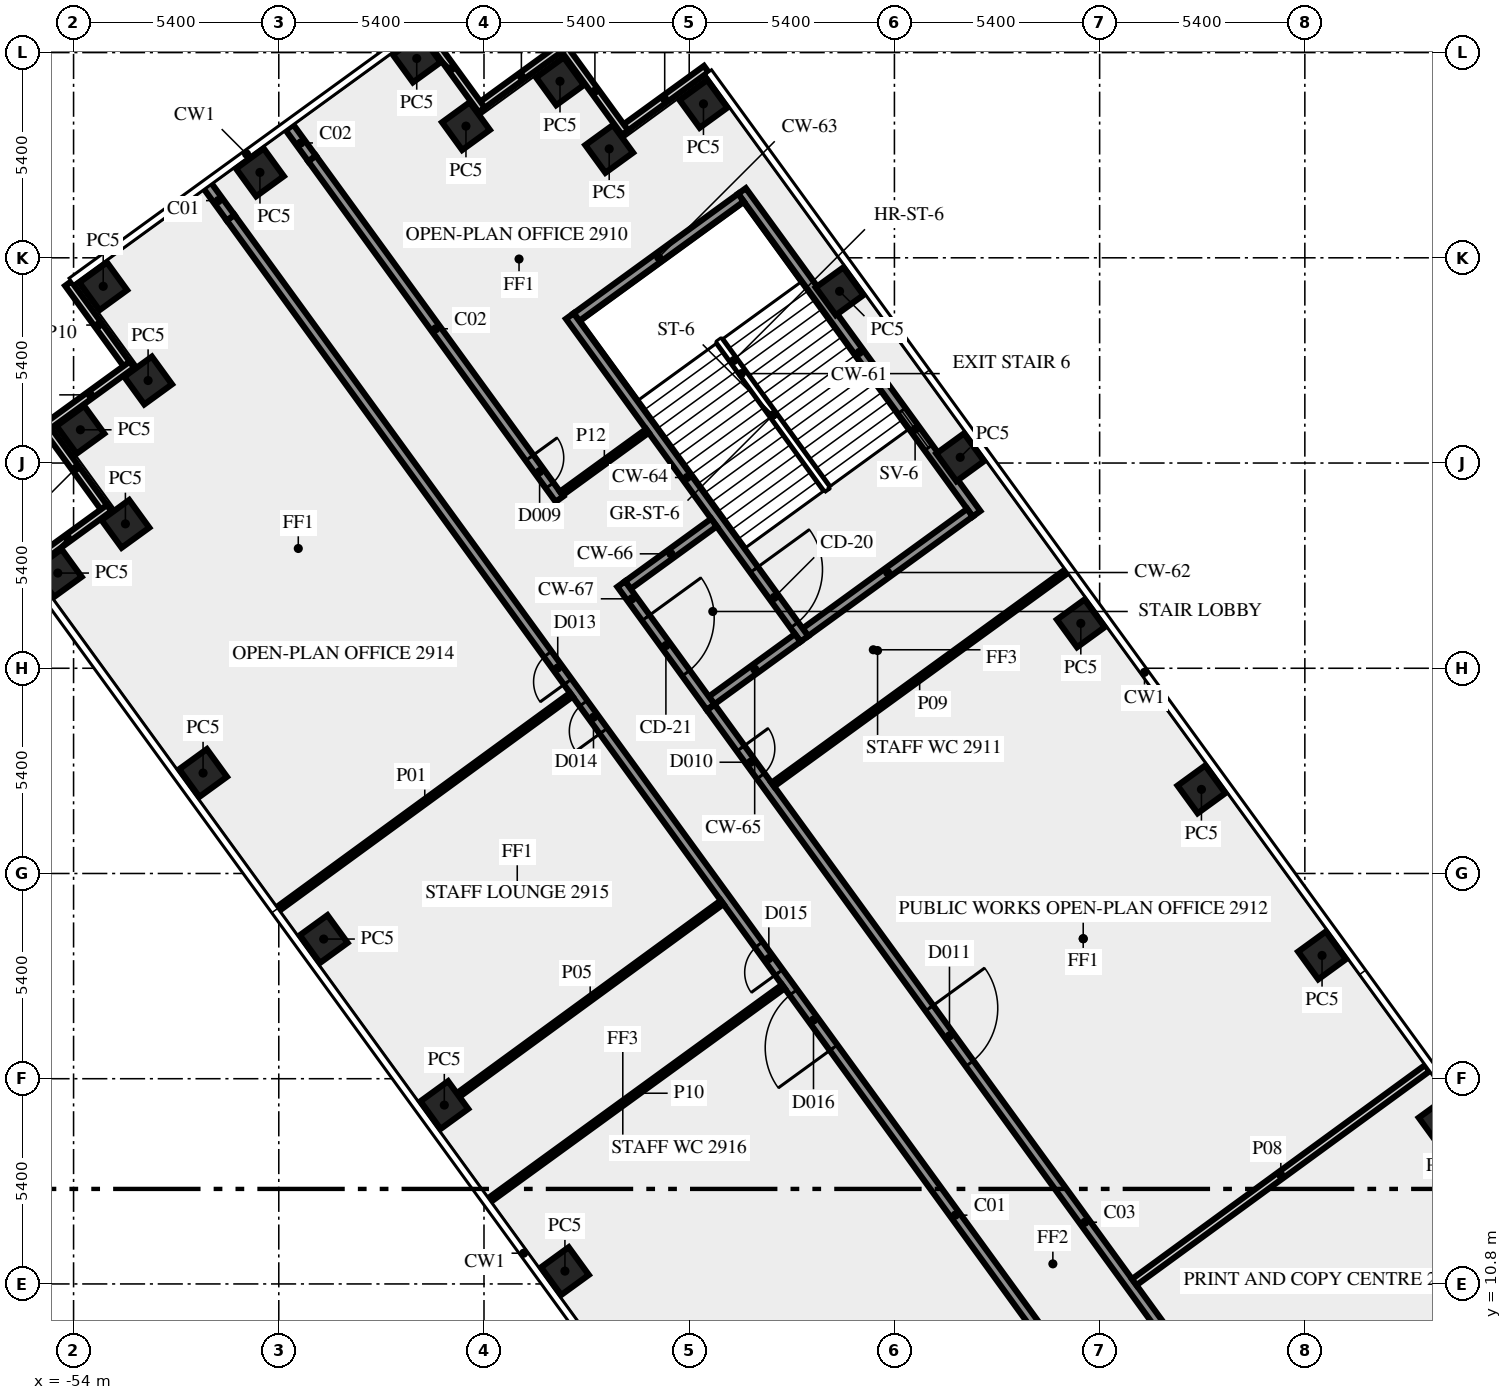
"""IFC4 building model, lengths in metres.
Left out: names, types, materials, properties, quantities, classifications, styles, units other than length and angle.
Written with IfcOpenShell. Run it as: python <this file> out.ifc"""

import sys

from ifc_helpers import new_model, si_unit, direction, frame, frame_2d, origin, origin_2d, place, context, subcontext, project, spatial, rectangle, extrude, element, fill, save


model = new_model("IFC4")
c1 = context("Model", 3, precision=1e-05, world=origin(), true_north=direction((0.0, 1.0)))
c2 = subcontext(c1, "Body", "Model", "MODEL_VIEW")
j1 = project(units=[si_unit("LENGTHUNIT", "METRE"), si_unit("PLANEANGLEUNIT", "RADIAN")], contexts=[c1])
p1 = place(None, origin())
s1 = spatial("IfcSite", under=j1, at=p1, CompositionType="ELEMENT")
p2 = place(p1, origin())
s2 = spatial("IfcBuilding", under=s1, at=p2, CompositionType="ELEMENT")
p3 = place(p2, frame((0.0, 0.0, 125.0)))
s3 = spatial("IfcBuildingStorey", under=s2, at=p3, CompositionType="ELEMENT", Elevation=125.0)
for number, where, z_axis, x_axis in (
    (1, (-17.974, 15.075, 0.0), (0.0, 0.0, 1.0), (-0.588, 0.809, 0.0)),
    (2, (-21.147, 19.444, 0.0), (0.0, 0.0, 1.0), (-0.588, 0.809, 0.0)),
    (3, (-24.321, 23.812, 0.0), (0.0, 0.0, 1.0), (-0.588, 0.809, 0.0)),
    (4, (-27.495, 28.181, 0.0), (0.0, 0.0, 1.0), (-0.588, 0.809, 0.0)),
    (5, (-30.669, 32.55, 0.0), (0.0, 0.0, 1.0), (-0.588, 0.809, 0.0)),
    (6, (-33.843, 36.919, 0.0), (0.0, 0.0, 1.0), (-0.588, 0.809, 0.0)),
    (7, (-37.425, 41.85, 0.0), (0.0, 0.0, 1.0), (-0.588, 0.809, 0.0)),
    (8, (-39.906, 40.666, 0.0), (0.0, 0.0, 1.0), (-0.588, 0.809, 0.0)),
    (9, (-41.2, 42.445, 0.0), (0.0, 0.0, 1.0), (-0.588, 0.809, 0.0)),
    (10, (-43.675, 41.265, 0.0), (0.0, 0.0, 1.0), (-0.809, -0.588, 0.0)),
    (11, (-44.97, 43.045, 0.0), (0.0, 0.0, 1.0), (-0.809, -0.588, 0.0)),
    (12, (-49.096, 40.047, 0.0), (0.0, 0.0, 1.0), (-0.809, -0.588, 0.0)),
    (13, (-53.22, 37.05, 0.0), (0.0, 0.0, 1.0), (0.588, -0.809, 0.0)),
    (14, (-52.039, 34.571, 0.0), (0.0, 0.0, 1.0), (-0.809, -0.588, 0.0)),
    (15, (-53.82, 33.275, 0.0), (0.0, 0.0, 1.0), (0.588, -0.809, 0.0)),
    (16, (-52.636, 30.8, 0.0), (0.0, 0.0, 1.0), (-0.809, -0.588, 0.0)),
    (17, (-54.415, 29.505, 0.0), (0.0, 0.0, 1.0), (0.588, -0.809, 0.0)),
    (18, (-50.592, 24.243, 0.0), (0.0, 0.0, 1.0), (0.588, -0.809, 0.0)),
    (19, (-47.418, 19.875, 0.0), (0.0, 0.0, 1.0), (0.588, -0.809, 0.0)),
    (20, (-44.244, 15.506, 0.0), (0.0, 0.0, 1.0), (0.588, -0.809, 0.0)),
    (21, (-41.07, 11.137, 0.0), (0.0, 0.0, 1.0), (0.588, -0.809, 0.0)),
):
    element("IfcColumn", number, at=place(p3, frame(where, z_axis=z_axis, x_axis=x_axis)), inside=s3, PredefinedType="COLUMN", context=c2, shape_type="SweptSolid", body=[
        extrude(rectangle(XDim=0.9, YDim=0.9, at=origin_2d()), origin(), (0.0, 0.0, 1.0), 3.65),
    ])
p4 = place(p3, frame((-37.353, 42.768, 0.0), z_axis=(0.0, 0.0, 1.0), x_axis=(-0.809033161865, -0.587762999008, 0.0)))
e22 = element("IfcWall", 22, at=p4, inside=s3, PredefinedType="SOLIDWALL", context=c2, shape_type="SweptSolid", body=[
    extrude(rectangle(XDim=2.7, YDim=0.2, at=frame_2d((1.35, 0.0))), origin(), (0.0, 0.0, 1.0), 3.65),
])
p5 = place(p3, frame((-39.488, 41.094, 0.0), z_axis=(0.0, 0.0, 1.0), x_axis=(-0.587806000234, 0.809001919707, 0.0)))
e23 = element("IfcWall", 23, at=p5, inside=s3, PredefinedType="SOLIDWALL", context=c2, shape_type="SweptSolid", body=[
    extrude(rectangle(XDim=2.7, YDim=0.2, at=frame_2d((1.35, 0.0))), origin(), (0.0, 0.0, 1.0), 3.65),
])
for number, where, z_axis, x_axis in (
    (24, (-41.124, 43.366, 0.0), (0.0, 0.0, 1.0), (-0.809, -0.588, 0.0)),
    (25, (-43.259, 41.691, 0.0), (0.0, 0.0, 1.0), (-0.588, 0.809, 0.0)),
    (26, (-54.14, 37.123, 0.0), (0.0, 0.0, 1.0), (0.588, -0.809, 0.0)),
    (27, (-52.465, 34.987, 0.0), (0.0, 0.0, 1.0), (-0.809, -0.588, 0.0)),
):
    element("IfcWall", number, at=place(p3, frame(where, z_axis=z_axis, x_axis=x_axis)), inside=s3, PredefinedType="SOLIDWALL", context=c2, shape_type="SweptSolid", body=[
        extrude(rectangle(XDim=2.7, YDim=0.2, at=frame_2d((1.35, 0.0))), origin(), (0.0, 0.0, 1.0), 3.65),
    ])
p6 = place(p3, frame((-54.738, 33.351, 0.0), z_axis=(0.0, 0.0, 1.0), x_axis=(0.587779184282, -0.809021403008, 0.0)))
e28 = element("IfcWall", 28, at=p6, inside=s3, PredefinedType="SOLIDWALL", context=c2, shape_type="SweptSolid", body=[
    extrude(rectangle(XDim=2.7, YDim=0.2, at=frame_2d((1.35, 0.0))), origin(), (0.0, 0.0, 1.0), 3.65),
])
p7 = place(p3, frame((-53.063, 31.216, 0.0), z_axis=(0.0, 0.0, 1.0), x_axis=(-0.809033161865, -0.587762999008, 0.0)))
e29 = element("IfcWall", 29, at=p7, inside=s3, PredefinedType="SOLIDWALL", context=c2, shape_type="SweptSolid", body=[
    extrude(rectangle(XDim=2.7, YDim=0.2, at=frame_2d((1.35, 0.0))), origin(), (0.0, 0.0, 1.0), 3.65),
])
p8 = place(p3, frame((-30.24, 31.064, 0.0), z_axis=(0.0, 0.0, 1.0), x_axis=(-0.587795589702, 0.809009483706, 0.0)))
e30 = element("IfcWall", 30, at=p8, inside=s3, PredefinedType="SHEAR", context=c2, shape_type="SweptSolid", body=[
    extrude(rectangle(XDim=10.5, YDim=0.25, at=frame_2d((5.25, 0.0))), origin(), (0.0, 0.0, 1.0), 3.65),
])
p9 = place(p8, frame((2.15, 0.0, 1.0)))
e31 = element("IfcOpeningElement", 31, at=p9, cuts=e30, PredefinedType="OPENING", context=c2, shape_type="SweptSolid", body=[
    extrude(rectangle(XDim=1.2, YDim=1.2, at=frame_2d((0.6, 0.6))), frame((0.0, 0.135, 0.0), z_axis=(0.0, -1.0, 0.0), x_axis=(1.0, 0.0, 0.0)), (0.0, 0.0, 1.0), 0.27),
])
p10 = place(p3, frame((-30.414, 31.092, 0.0), z_axis=(0.0, 0.0, 1.0), x_axis=(-0.8089984606, -0.587810760999, 0.0)))
e32 = element("IfcWall", 32, at=p10, inside=s3, PredefinedType="SHEAR", context=c2, shape_type="SweptSolid", body=[
    extrude(rectangle(XDim=5.35, YDim=0.25, at=frame_2d((2.675, 0.0))), origin(), (0.0, 0.0, 1.0), 3.65),
])
p11 = place(p3, frame((-36.439, 39.384, 0.0), z_axis=(0.0, 0.0, 1.0), x_axis=(-0.809020161303, -0.587780893365, 0.0)))
e33 = element("IfcWall", 33, at=p11, inside=s3, PredefinedType="SHEAR", context=c2, shape_type="SweptSolid", body=[
    extrude(rectangle(XDim=5.35, YDim=0.25, at=frame_2d((2.675, 0.0))), origin(), (0.0, 0.0, 1.0), 3.65),
])
p12 = place(p3, frame((-40.942, 36.267, 0.0), z_axis=(0.0, 0.0, 1.0), x_axis=(0.587795589702, -0.809009483706, 0.0)))
e34 = element("IfcWall", 34, at=p12, inside=s3, PredefinedType="SHEAR", context=c2, shape_type="SweptSolid", body=[
    extrude(rectangle(XDim=10.5, YDim=0.25, at=frame_2d((5.25, 0.0))), origin(), (0.0, 0.0, 1.0), 3.65),
])
p13 = place(p12, frame((8.25, 0.0, 0.0)))
e35 = element("IfcOpeningElement", 35, at=p13, cuts=e34, PredefinedType="OPENING", context=c2, shape_type="SweptSolid", body=[
    extrude(rectangle(XDim=1.8, YDim=2.1, at=frame_2d((0.9, 1.05))), frame((0.0, 0.135, 0.0), z_axis=(0.0, -1.0, 0.0), x_axis=(1.0, 0.0, 0.0)), (0.0, 0.0, 1.0), 0.27),
])
for number, where, z_axis, x_axis in (
    (36, (-34.945, 27.8, 0.0), (0.0, 0.0, 1.0), (-0.809, -0.588, 0.0)),
    (37, (-37.149, 30.834, 0.0), (0.0, 0.0, 1.0), (-0.809, -0.588, 0.0)),
):
    element("IfcWall", number, at=place(p3, frame(where, z_axis=z_axis, x_axis=x_axis)), inside=s3, PredefinedType="SHEAR", context=c2, shape_type="SweptSolid", body=[
        extrude(rectangle(XDim=2.8, YDim=0.25, at=frame_2d((1.4, 0.0))), origin(), (0.0, 0.0, 1.0), 3.65),
    ])
p14 = place(p3, frame((-39.589, 29.216, 0.0), z_axis=(0.0, 0.0, 1.0), x_axis=(0.587772420479, -0.809026317077, 0.0)))
e38 = element("IfcWall", 38, at=p14, inside=s3, PredefinedType="SHEAR", context=c2, shape_type="SweptSolid", body=[
    extrude(rectangle(XDim=4.0, YDim=0.25, at=frame_2d((2.0, 0.0))), origin(), (0.0, 0.0, 1.0), 3.65),
])
p15 = place(p14, frame((1.1, 0.0, 0.0)))
e39 = element("IfcOpeningElement", 39, at=p15, cuts=e38, PredefinedType="OPENING", context=c2, shape_type="SweptSolid", body=[
    extrude(rectangle(XDim=1.8, YDim=2.1, at=frame_2d((0.9, 1.05))), frame((0.0, 0.135, 0.0), z_axis=(0.0, -1.0, 0.0), x_axis=(1.0, 0.0, 0.0)), (0.0, 0.0, 1.0), 0.27),
])
p16 = place(p3, frame((-20.531, -1.523, 0.0), z_axis=(0.0, 0.0, 1.0), x_axis=(-0.587784522481, 0.809017524614, 0.0)))
e40 = element("IfcWall", 40, at=p16, inside=s3, PredefinedType="SOLIDWALL", context=c2, shape_type="SweptSolid", body=[
    extrude(rectangle(XDim=49.912, YDim=0.25, at=frame_2d((24.956, 0.0))), origin(), (0.0, 0.0, 1.0), 3.65),
])
p17 = place(p16, frame((34.816, 0.0, 0.0)))
e41 = element("IfcOpeningElement", 41, at=p17, cuts=e40, PredefinedType="OPENING", context=c2, shape_type="SweptSolid", body=[
    extrude(rectangle(XDim=0.9, YDim=2.1, at=frame_2d((0.45, 1.05))), frame((0.0, 0.135, 0.0), z_axis=(0.0, -1.0, 0.0), x_axis=(1.0, 0.0, 0.0)), (0.0, 0.0, 1.0), 0.27),
])
p18 = place(p16, frame((33.215, 0.0, 0.0)))
e42 = element("IfcOpeningElement", 42, at=p18, cuts=e40, PredefinedType="OPENING", context=c2, shape_type="SweptSolid", body=[
    extrude(rectangle(XDim=0.9, YDim=2.1, at=frame_2d((0.45, 1.05))), frame((0.0, 0.135, 0.0), z_axis=(0.0, -1.0, 0.0), x_axis=(1.0, 0.0, 0.0)), (0.0, 0.0, 1.0), 0.27),
])
p19 = place(p16, frame((22.916, 0.0, 0.0)))
e43 = element("IfcOpeningElement", 43, at=p19, cuts=e40, PredefinedType="OPENING", context=c2, shape_type="SweptSolid", body=[
    extrude(rectangle(XDim=1.8, YDim=2.1, at=frame_2d((0.9, 1.05))), frame((0.0, 0.135, 0.0), z_axis=(0.0, -1.0, 0.0), x_axis=(1.0, 0.0, 0.0)), (0.0, 0.0, 1.0), 0.27),
])
p20 = place(p16, frame((0.483, 0.0, 0.0)))
e44 = element("IfcOpeningElement", 44, at=p20, cuts=e40, PredefinedType="OPENING", context=c2, shape_type="SweptSolid", body=[
    extrude(rectangle(XDim=1.8, YDim=2.1, at=frame_2d((0.9, 1.05))), frame((0.0, 0.135, 0.0), z_axis=(0.0, -1.0, 0.0), x_axis=(1.0, 0.0, 0.0)), (0.0, 0.0, 1.0), 0.27),
])
p21 = place(p16, frame((25.365, 0.0, 0.0)))
e45 = element("IfcOpeningElement", 45, at=p21, cuts=e40, PredefinedType="OPENING", context=c2, shape_type="SweptSolid", body=[
    extrude(rectangle(XDim=0.9, YDim=2.1, at=frame_2d((0.45, 1.05))), frame((0.0, 0.135, 0.0), z_axis=(0.0, -1.0, 0.0), x_axis=(1.0, 0.0, 0.0)), (0.0, 0.0, 1.0), 0.27),
])
p22 = place(p3, frame((-47.725, 40.414, 0.0), z_axis=(0.0, 0.0, 1.0), x_axis=(0.587773291021, -0.809025684612, 0.0)))
e46 = element("IfcWall", 46, at=p22, inside=s3, PredefinedType="SOLIDWALL", context=c2, shape_type="SweptSolid", body=[
    extrude(rectangle(XDim=11.079, YDim=0.25, at=frame_2d((5.539, 0.0))), origin(), (0.0, 0.0, 1.0), 3.65),
])
p23 = place(p22, frame((9.737, 0.0, 0.0)))
e47 = element("IfcOpeningElement", 47, at=p23, cuts=e46, PredefinedType="OPENING", context=c2, shape_type="SweptSolid", body=[
    extrude(rectangle(XDim=0.9, YDim=2.1, at=frame_2d((0.45, 1.05))), frame((0.0, 0.135, 0.0), z_axis=(0.0, -1.0, 0.0), x_axis=(1.0, 0.0, 0.0)), (0.0, 0.0, 1.0), 0.27),
])
p24 = place(p3, frame((-37.232, 25.972, 0.0), z_axis=(0.0, 0.0, 1.0), x_axis=(0.587786323093, -0.809016216391, 0.0)))
e48 = element("IfcWall", 48, at=p24, inside=s3, PredefinedType="SOLIDWALL", context=c2, shape_type="SweptSolid", body=[
    extrude(rectangle(XDim=33.493, YDim=0.25, at=frame_2d((16.747, 0.0))), origin(), (0.0, 0.0, 1.0), 3.65),
])
p25 = place(p24, frame((9.785, 0.0, 0.0)))
e49 = element("IfcOpeningElement", 49, at=p25, cuts=e48, PredefinedType="OPENING", context=c2, shape_type="SweptSolid", body=[
    extrude(rectangle(XDim=1.8, YDim=2.1, at=frame_2d((0.9, 1.05))), frame((0.0, 0.135, 0.0), z_axis=(0.0, -1.0, 0.0), x_axis=(1.0, 0.0, 0.0)), (0.0, 0.0, 1.0), 0.27),
])
p26 = place(p24, frame((29.152, 0.0, 0.0)))
e50 = element("IfcOpeningElement", 50, at=p26, cuts=e48, PredefinedType="OPENING", context=c2, shape_type="SweptSolid", body=[
    extrude(rectangle(XDim=0.9, YDim=2.1, at=frame_2d((0.45, 1.05))), frame((0.0, 0.135, 0.0), z_axis=(0.0, -1.0, 0.0), x_axis=(1.0, 0.0, 0.0)), (0.0, 0.0, 1.0), 0.27),
])
p27 = place(p24, frame((1.335, 0.0, 0.0)))
e51 = element("IfcOpeningElement", 51, at=p27, cuts=e48, PredefinedType="OPENING", context=c2, shape_type="SweptSolid", body=[
    extrude(rectangle(XDim=0.9, YDim=2.1, at=frame_2d((0.45, 1.05))), frame((0.0, 0.135, 0.0), z_axis=(0.0, -1.0, 0.0), x_axis=(1.0, 0.0, 0.0)), (0.0, 0.0, 1.0), 0.27),
])
p28 = place(p3, frame((-48.615, 20.671, 0.0), z_axis=(0.0, 0.0, 1.0), x_axis=(0.807691251741, 0.589605666408, 0.0)))
e52 = element("IfcWall", 52, at=p28, inside=s3, PredefinedType="PARTITIONING", context=c2, shape_type="SweptSolid", body=[
    extrude(rectangle(XDim=9.55, YDim=0.12, at=frame_2d((4.775, 0.0))), origin(), (0.0, 0.0, 1.0), 2.75),
])
p29 = place(p3, frame((-43.876, 15.773, 0.0), z_axis=(0.0, 0.0, 1.0), x_axis=(0.807597163234, 0.589734535139, 0.0)))
e53 = element("IfcWall", 53, at=p29, inside=s3, PredefinedType="PARTITIONING", context=c2, shape_type="SweptSolid", body=[
    extrude(rectangle(XDim=8.595, YDim=0.12, at=frame_2d((4.298, 0.0))), origin(), (0.0, 0.0, 1.0), 3.65),
])
p30 = place(p3, frame((-26.089, 10.848, 0.0), z_axis=(0.0, 0.0, 1.0), x_axis=(0.807661302092, 0.589646691759, 0.0)))
e54 = element("IfcWall", 54, at=p30, inside=s3, PredefinedType="SOLIDWALL", context=c2, shape_type="SweptSolid", body=[
    extrude(rectangle(XDim=9.55, YDim=0.2, at=frame_2d((4.775, 0.0))), origin(), (0.0, 0.0, 1.0), 2.75),
])
p31 = place(p3, frame((-27.873, 29.551, 0.0), z_axis=(0.0, 0.0, 1.0), x_axis=(-0.809043311713, -0.587749027879, 0.0)))
e55 = element("IfcWall", 55, at=p31, inside=s3, PredefinedType="PARTITIONING", context=c2, shape_type="SweptSolid", body=[
    extrude(rectangle(XDim=9.55, YDim=0.12, at=frame_2d((4.775, 0.0))), origin(), (0.0, 0.0, 1.0), 2.75),
])
p32 = place(p3, frame((-35.324, 18.625, 0.0), z_axis=(0.0, 0.0, 1.0), x_axis=(-0.808998008689, -0.58781138296, 0.0)))
e56 = element("IfcWall", 56, at=p32, inside=s3, PredefinedType="PARTITIONING", context=c2, shape_type="SweptSolid", body=[
    extrude(rectangle(XDim=9.55, YDim=0.12, at=frame_2d((4.775, 0.0))), origin(), (0.0, 0.0, 1.0), 2.75),
])
p33 = place(p3, frame((-41.166, 31.599, 0.0), z_axis=(0.0, 0.0, 1.0), x_axis=(0.809090262332, 0.587684394381, 0.0)))
e57 = element("IfcWall", 57, at=p33, inside=s3, PredefinedType="PARTITIONING", context=c2, shape_type="SweptSolid", body=[
    extrude(rectangle(XDim=2.801, YDim=0.12, at=frame_2d((1.4, 0.0))), origin(), (0.0, 0.0, 1.0), 3.65),
])
p34 = place(p3, frame((-49.869, 38.856, 0.0), z_axis=(0.0, 0.0, 1.0), x_axis=(-0.587674273289, 0.809097613712, 0.0)))
e58 = element("IfcWall", 58, at=p34, inside=s3, PredefinedType="SOLIDWALL", context=c2, shape_type="SweptSolid", body=[
    extrude(rectangle(XDim=1.109, YDim=0.25, at=frame_2d((0.555, 0.0))), origin(), (0.0, 0.0, 1.0), 2.75),
])
p35 = place(p3, frame((-47.725, 40.414, 0.0), z_axis=(0.0, 0.0, 1.0), x_axis=(-0.587840411638, 0.808976915892, 0.0)))
e59 = element("IfcWall", 59, at=p35, inside=s3, PredefinedType="SOLIDWALL", context=c2, shape_type="SweptSolid", body=[
    extrude(rectangle(XDim=1.008, YDim=0.25, at=frame_2d((0.504, 0.0))), origin(), (0.0, 0.0, 1.0), 2.75),
])
p36 = place(p9, origin())
e60 = element("IfcWindow", 60, at=p36, inside=s3, PartitioningType="SINGLE_PANEL", PredefinedType="WINDOW", context=c2, shape_type="SweptSolid", body=[
    extrude(rectangle(XDim=1.2, YDim=1.2, at=frame_2d((0.6, 0.6))), frame((0.0, 0.03, 0.0), z_axis=(0.0, -1.0, 0.0), x_axis=(1.0, 0.0, 0.0)), (0.0, 0.0, 1.0), 0.06),
])
fill(e31, e60)
p37 = place(p13, origin())
e61 = element("IfcDoor", 61, at=p37, inside=s3, OperationType="DOUBLE_DOOR_SINGLE_SWING", PredefinedType="DOOR", context=c2, shape_type="SweptSolid", body=[
    extrude(rectangle(XDim=1.8, YDim=2.1, at=frame_2d((0.9, 1.05))), frame((0.0, 0.025, 0.0), z_axis=(0.0, -1.0, 0.0), x_axis=(1.0, 0.0, 0.0)), (0.0, 0.0, 1.0), 0.05),
])
fill(e35, e61)
p38 = place(p15, origin())
e62 = element("IfcDoor", 62, at=p38, inside=s3, OperationType="DOUBLE_DOOR_SINGLE_SWING", PredefinedType="DOOR", context=c2, shape_type="SweptSolid", body=[
    extrude(rectangle(XDim=1.8, YDim=2.1, at=frame_2d((0.9, 1.05))), frame((0.0, 0.025, 0.0), z_axis=(0.0, -1.0, 0.0), x_axis=(1.0, 0.0, 0.0)), (0.0, 0.0, 1.0), 0.05),
])
fill(e39, e62)
p39 = place(p23, origin())
e63 = element("IfcDoor", 63, at=p39, inside=s3, OperationType="SINGLE_SWING_RIGHT", PredefinedType="DOOR", context=c2, shape_type="SweptSolid", body=[
    extrude(rectangle(XDim=0.9, YDim=2.1, at=frame_2d((0.45, 1.05))), frame((0.0, 0.025, 0.0), z_axis=(0.0, -1.0, 0.0), x_axis=(1.0, 0.0, 0.0)), (0.0, 0.0, 1.0), 0.05),
])
fill(e47, e63)
p40 = place(p17, origin())
e64 = element("IfcDoor", 64, at=p40, inside=s3, OperationType="SINGLE_SWING_LEFT", PredefinedType="DOOR", context=c2, shape_type="SweptSolid", body=[
    extrude(rectangle(XDim=0.9, YDim=2.1, at=frame_2d((0.45, 1.05))), frame((0.0, 0.025, 0.0), z_axis=(0.0, -1.0, 0.0), x_axis=(1.0, 0.0, 0.0)), (0.0, 0.0, 1.0), 0.05),
])
fill(e41, e64)
p41 = place(p18, origin())
e65 = element("IfcDoor", 65, at=p41, inside=s3, OperationType="SINGLE_SWING_RIGHT", PredefinedType="DOOR", context=c2, shape_type="SweptSolid", body=[
    extrude(rectangle(XDim=0.9, YDim=2.1, at=frame_2d((0.45, 1.05))), frame((0.0, 0.025, 0.0), z_axis=(0.0, -1.0, 0.0), x_axis=(1.0, 0.0, 0.0)), (0.0, 0.0, 1.0), 0.05),
])
fill(e42, e65)
p42 = place(p25, origin())
e66 = element("IfcDoor", 66, at=p42, inside=s3, OperationType="DOUBLE_DOOR_SINGLE_SWING", PredefinedType="DOOR", context=c2, shape_type="SweptSolid", body=[
    extrude(rectangle(XDim=1.8, YDim=2.1, at=frame_2d((0.9, 1.05))), frame((0.0, 0.025, 0.0), z_axis=(0.0, -1.0, 0.0), x_axis=(1.0, 0.0, 0.0)), (0.0, 0.0, 1.0), 0.05),
])
fill(e49, e66)
p43 = place(p19, origin())
e67 = element("IfcDoor", 67, at=p43, inside=s3, OperationType="DOUBLE_DOOR_SINGLE_SWING", PredefinedType="DOOR", context=c2, shape_type="SweptSolid", body=[
    extrude(rectangle(XDim=1.8, YDim=2.1, at=frame_2d((0.9, 1.05))), frame((0.0, 0.025, 0.0), z_axis=(0.0, -1.0, 0.0), x_axis=(1.0, 0.0, 0.0)), (0.0, 0.0, 1.0), 0.05),
])
fill(e43, e67)
p44 = place(p27, origin())
e68 = element("IfcDoor", 68, at=p44, inside=s3, OperationType="SINGLE_SWING_RIGHT", PredefinedType="DOOR", context=c2, shape_type="SweptSolid", body=[
    extrude(rectangle(XDim=0.9, YDim=2.1, at=frame_2d((0.45, 1.05))), frame((0.0, 0.025, 0.0), z_axis=(0.0, -1.0, 0.0), x_axis=(1.0, 0.0, 0.0)), (0.0, 0.0, 1.0), 0.05),
])
fill(e51, e68)
p45 = place(p21, origin())
e69 = element("IfcDoor", 69, at=p45, inside=s3, OperationType="SINGLE_SWING_LEFT", PredefinedType="DOOR", context=c2, shape_type="SweptSolid", body=[
    extrude(rectangle(XDim=0.9, YDim=2.1, at=frame_2d((0.45, 1.05))), frame((0.0, 0.025, 0.0), z_axis=(0.0, -1.0, 0.0), x_axis=(1.0, 0.0, 0.0)), (0.0, 0.0, 1.0), 0.05),
])
fill(e45, e69)
save(model, sys.argv[1])
